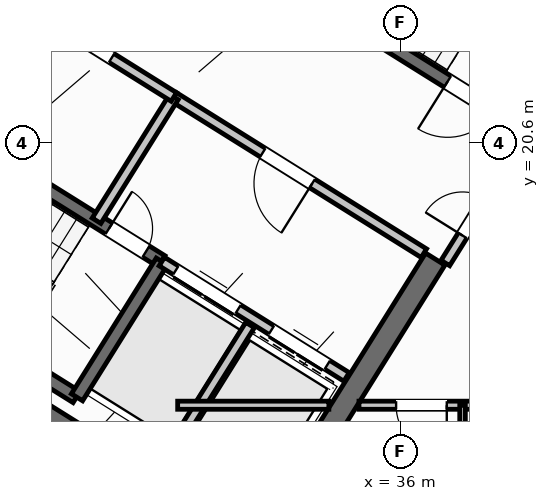
"""IFC4 building model, lengths in metres.
Left out: names, types, materials, properties, quantities, classifications, styles, units other than length and angle.
Written with IfcOpenShell. Run it as: python <this file> out.ifc"""

import sys

from ifc_helpers import new_model, si_unit, direction, frame, frame_2d, origin, place, context, subcontext, project, spatial, rectangle, extrude, source, transform, mapped, element, fill, save


model = new_model("IFC4")
c1 = context("Model", 3, precision=1e-05, world=origin(), true_north=direction((0.0, 1.0)))
c2 = subcontext(c1, "Body", "Model", "MODEL_VIEW")
j1 = project(units=[si_unit("LENGTHUNIT", "METRE"), si_unit("PLANEANGLEUNIT", "RADIAN")], contexts=[c1])
p1 = place(None, origin())
s1 = spatial("IfcSite", under=j1, at=p1, CompositionType="ELEMENT")
p2 = place(p1, origin())
s2 = spatial("IfcBuilding", under=s1, at=p2, CompositionType="ELEMENT")
p3 = place(p2, frame((0.0, 0.0, 251.1)))
s3 = spatial("IfcBuildingStorey", under=s2, at=p3, CompositionType="ELEMENT", Elevation=251.1)
p4 = place(p3, frame((33.324, 12.503, 0.0), z_axis=(0.0, 0.0, 1.0), x_axis=(-0.848043529849, 0.529926571782, 0.0)))
e1 = element("IfcWall", 1, at=p4, inside=s3, PredefinedType="SHEAR", context=c2, shape_type="SweptSolid", body=[
    extrude(rectangle(XDim=13.04, YDim=0.45, at=frame_2d((6.52, 0.0))), origin(), (0.0, 0.0, 1.0), 3.32),
])
p5 = place(p3, frame((36.683, 18.304, 0.0), z_axis=(0.0, 0.0, 1.0), x_axis=(-0.529904039071, -0.848057609704, 0.0)))
e2 = element("IfcWall", 2, at=p5, inside=s3, PredefinedType="SHEAR", context=c2, shape_type="SweptSolid", body=[
    extrude(rectangle(XDim=6.475, YDim=0.45, at=frame_2d((3.238, 0.0))), origin(), (0.0, 0.0, 1.0), 3.32),
])
p6 = place(p3, frame((29.268, 6.429, 0.0), z_axis=(0.0, 0.0, 1.0), x_axis=(-0.848049971435, 0.529916263149, 0.0)))
e3 = element("IfcWall", 3, at=p6, inside=s3, PredefinedType="STANDARD", context=c2, shape_type="SweptSolid", body=[
    extrude(rectangle(XDim=31.588, YDim=0.32, at=frame_2d((15.794, 0.0))), origin(), (0.0, 0.0, 1.0), 3.32),
])
p7 = place(p6, frame((22.848, 0.0, 0.0)))
e4 = element("IfcOpeningElement", 4, at=p7, cuts=e3, PredefinedType="OPENING", context=c2, shape_type="SweptSolid", body=[
    extrude(rectangle(XDim=1.2, YDim=2.15, at=frame_2d((0.6, 1.075))), frame((0.0, 0.17, 0.0), z_axis=(0.0, -1.0, 0.0), x_axis=(1.0, 0.0, 0.0)), (0.0, 0.0, 1.0), 0.34),
])
p8 = place(p6, frame((3.178, 0.0, 0.9)))
e5 = element("IfcOpeningElement", 5, at=p8, cuts=e3, PredefinedType="OPENING", context=c2, shape_type="SweptSolid", body=[
    extrude(rectangle(XDim=1.65, YDim=1.45, at=frame_2d((0.825, 0.725))), frame((0.0, 0.17, 0.0), z_axis=(0.0, -1.0, 0.0), x_axis=(1.0, 0.0, 0.0)), (0.0, 0.0, 1.0), 0.34),
])
p9 = place(p6, frame((8.478, 0.0, 0.9)))
e6 = element("IfcOpeningElement", 6, at=p9, cuts=e3, PredefinedType="OPENING", context=c2, shape_type="SweptSolid", body=[
    extrude(rectangle(XDim=1.65, YDim=1.45, at=frame_2d((0.825, 0.725))), frame((0.0, 0.17, 0.0), z_axis=(0.0, -1.0, 0.0), x_axis=(1.0, 0.0, 0.0)), (0.0, 0.0, 1.0), 0.34),
])
p10 = place(p3, frame((29.605, 15.581, 0.0), z_axis=(0.0, 0.0, 1.0), x_axis=(-0.848036911448, 0.529937163087, 0.0)))
e7 = element("IfcWall", 7, at=p10, inside=s3, PredefinedType="SHEAR", context=c2, shape_type="SweptSolid", body=[
    extrude(rectangle(XDim=7.46, YDim=0.26, at=frame_2d((3.73, 0.0))), origin(), (0.0, 0.0, 1.0), 3.32),
])
p11 = place(p3, frame((31.28, 18.261, 0.0), z_axis=(0.0, 0.0, 1.0), x_axis=(-0.848051618787, 0.529913626805, 0.0)))
e8 = element("IfcWall", 8, at=p11, inside=s3, PredefinedType="SHEAR", context=c2, shape_type="SweptSolid", body=[
    extrude(rectangle(XDim=7.46, YDim=0.26, at=frame_2d((3.73, 0.0))), origin(), (0.0, 0.0, 1.0), 3.32),
])
p12 = place(p11, frame((0.36, 0.0, 0.0)))
e9 = element("IfcOpeningElement", 9, at=p12, cuts=e8, PredefinedType="OPENING", context=c2, shape_type="SweptSolid", body=[
    extrude(rectangle(XDim=0.86, YDim=2.05, at=frame_2d((0.43, 1.025))), frame((0.0, 0.14, 0.0), z_axis=(0.0, -1.0, 0.0), x_axis=(1.0, 0.0, 0.0)), (0.0, 0.0, 1.0), 0.28),
])
p13 = place(p3, frame((31.288, 18.256, 0.0), z_axis=(0.0, 0.0, 1.0), x_axis=(-0.529943379326, -0.848033026897, 0.0)))
e10 = element("IfcWall", 10, at=p13, inside=s3, PredefinedType="SHEAR", context=c2, shape_type="SweptSolid", body=[
    extrude(rectangle(XDim=3.16, YDim=0.26, at=frame_2d((1.58, 0.0))), origin(), (0.0, 0.0, 1.0), 3.32),
])
p14 = place(p3, frame((38.046, 21.108, 0.0), z_axis=(0.0, 0.0, 1.0), x_axis=(-0.848054434086, 0.529909121291, 0.0)))
e11 = element("IfcWall", 11, at=p14, inside=s3, PredefinedType="SHEAR", context=c2, shape_type="SweptSolid", body=[
    extrude(rectangle(XDim=7.33, YDim=0.26, at=frame_2d((3.665, 0.0))), origin(), (0.0, 0.0, 1.0), 3.32),
])
p15 = place(p14, frame((0.22, 0.0, 0.0)))
e12 = element("IfcOpeningElement", 12, at=p15, cuts=e11, PredefinedType="OPENING", context=c2, shape_type="SweptSolid", body=[
    extrude(rectangle(XDim=1.1, YDim=2.1, at=frame_2d((0.55, 1.05))), frame((0.0, 0.14, 0.0), z_axis=(0.0, -1.0, 0.0), x_axis=(1.0, 0.0, 0.0)), (0.0, 0.0, 1.0), 0.28),
])
p16 = place(p3, frame((34.933, 15.978, 0.0), z_axis=(0.0, 0.0, 1.0), x_axis=(-0.848055739377, 0.529907032327, 0.0)))
e13 = element("IfcWall", 13, at=p16, inside=s3, PredefinedType="STANDARD", context=c2, shape_type="SweptSolid", body=[
    extrude(rectangle(XDim=4.298, YDim=0.2, at=frame_2d((2.149, 0.0))), origin(), (0.0, 0.0, 1.0), 3.31),
])
p17 = place(p16, frame((0.448, 0.0, 0.0)))
e14 = element("IfcOpeningElement", 14, at=p17, cuts=e13, PredefinedType="OPENING", context=c2, shape_type="SweptSolid", body=[
    extrude(rectangle(XDim=1.3, YDim=2.2, at=frame_2d((0.65, 1.1))), frame((0.0, 0.11, 0.0), z_axis=(0.0, -1.0, 0.0), x_axis=(1.0, 0.0, 0.0)), (0.0, 0.0, 1.0), 0.22),
])
p18 = place(p16, frame((2.523, 0.0, 0.0)))
e15 = element("IfcOpeningElement", 15, at=p18, cuts=e13, PredefinedType="OPENING", context=c2, shape_type="SweptSolid", body=[
    extrude(rectangle(XDim=1.45, YDim=2.25, at=frame_2d((0.725, 1.125))), frame((0.0, 0.11, 0.0), z_axis=(0.0, -1.0, 0.0), x_axis=(1.0, 0.0, 0.0)), (0.0, 0.0, 1.0), 0.22),
])
p19 = place(p3, frame((36.459, 18.421, 0.0), z_axis=(0.0, 0.0, 1.0), x_axis=(-0.848059591691, 0.529900867089, 0.0)))
e16 = element("IfcWall", 16, at=p19, inside=s3, PredefinedType="STANDARD", context=c2, shape_type="SweptSolid", body=[
    extrude(rectangle(XDim=5.818, YDim=0.2, at=frame_2d((2.909, 0.0))), origin(), (0.0, 0.0, 1.0), 3.31),
])
p20 = place(p19, frame((2.598, 0.0, 0.0)))
e17 = element("IfcOpeningElement", 17, at=p20, cuts=e16, PredefinedType="OPENING", context=c2, shape_type="SweptSolid", body=[
    extrude(rectangle(XDim=1.15, YDim=2.1, at=frame_2d((0.575, 1.05))), frame((0.0, 0.11, 0.0), z_axis=(0.0, -1.0, 0.0), x_axis=(1.0, 0.0, 0.0)), (0.0, 0.0, 1.0), 0.22),
])
p21 = place(p3, frame((33.029, 17.003, 0.0), z_axis=(0.0, 0.0, 1.0), x_axis=(-0.529916267533, -0.848049968695, 0.0)))
e18 = element("IfcWall", 18, at=p21, inside=s3, PredefinedType="STANDARD", context=c2, shape_type="SweptSolid", body=[
    extrude(rectangle(XDim=2.92, YDim=0.2, at=frame_2d((1.46, 0.0))), origin(), (0.0, 0.0, 1.0), 3.31),
])
p22 = place(p3, frame((31.525, 21.504, 0.0), z_axis=(0.0, 0.0, 1.0), x_axis=(-0.529907497854, -0.848055448493, 0.0)))
e19 = element("IfcWall", 19, at=p22, inside=s3, PredefinedType="STANDARD", context=c2, shape_type="SweptSolid", body=[
    extrude(rectangle(XDim=2.88, YDim=0.2, at=frame_2d((1.44, 0.0))), origin(), (0.0, 0.0, 1.0), 3.31),
])
p23 = place(p3, frame((31.525, 21.504, 0.0), z_axis=(0.0, 0.0, 1.0), x_axis=(-0.848042066329, 0.529928913853, 0.0)))
e20 = element("IfcWall", 20, at=p23, inside=s3, PredefinedType="STANDARD", context=c2, shape_type="SweptSolid", body=[
    extrude(rectangle(XDim=6.268, YDim=0.2, at=frame_2d((3.134, 0.0))), origin(), (0.0, 0.0, 1.0), 3.31),
])
p24 = place(p23, frame((4.4, 0.0, 0.0)))
e21 = element("IfcOpeningElement", 21, at=p24, cuts=e20, PredefinedType="OPENING", context=c2, shape_type="SweptSolid", body=[
    extrude(rectangle(XDim=0.86, YDim=2.05, at=frame_2d((0.43, 1.025))), frame((0.0, 0.11, 0.0), z_axis=(0.0, -1.0, 0.0), x_axis=(1.0, 0.0, 0.0)), (0.0, 0.0, 1.0), 0.22),
])
p25 = place(p23, frame((1.45, 0.0, 0.0)))
e22 = element("IfcOpeningElement", 22, at=p25, cuts=e20, PredefinedType="OPENING", context=c2, shape_type="SweptSolid", body=[
    extrude(rectangle(XDim=0.86, YDim=2.05, at=frame_2d((0.43, 1.025))), frame((0.0, 0.11, 0.0), z_axis=(0.0, -1.0, 0.0), x_axis=(1.0, 0.0, 0.0)), (0.0, 0.0, 1.0), 0.22),
])
p26 = place(p3, frame((32.164, 10.374, 0.0), z_axis=(0.0, 0.0, 1.0), x_axis=(-0.848044107957, 0.529925646633, 0.0)))
e23 = element("IfcWall", 23, at=p26, inside=s3, PredefinedType="PARTITIONING", context=c2, shape_type="SweptSolid", body=[
    extrude(rectangle(XDim=15.57, YDim=0.16, at=frame_2d((7.785, 0.0))), origin(), (0.0, 0.0, 1.0), 3.31),
])
p27 = place(p26, frame((10.83, 0.0, 0.0)))
e24 = element("IfcOpeningElement", 24, at=p27, cuts=e23, PredefinedType="OPENING", context=c2, shape_type="SweptSolid", body=[
    extrude(rectangle(XDim=1.0, YDim=2.1, at=frame_2d((0.5, 1.05))), frame((0.0, 0.09, 0.0), z_axis=(0.0, -1.0, 0.0), x_axis=(1.0, 0.0, 0.0)), (0.0, 0.0, 1.0), 0.18),
])
p28 = place(p3, frame((29.72, 8.859, 0.0), z_axis=(0.0, 0.0, 1.0), x_axis=(-0.848049134363, 0.529917602752, 0.0)))
e25 = element("IfcWall", 25, at=p28, inside=s3, PredefinedType="PLUMBINGWALL", context=c2, shape_type="SweptSolid", body=[
    extrude(rectangle(XDim=14.3, YDim=0.14, at=frame_2d((7.15, 0.0))), origin(), (0.0, 0.0, 1.0), 3.31),
])
p29 = place(p28, frame((9.57, 0.0, 0.0)))
e26 = element("IfcOpeningElement", 26, at=p29, cuts=e25, PredefinedType="OPENING", context=c2, shape_type="SweptSolid", body=[
    extrude(rectangle(XDim=0.92, YDim=2.08, at=frame_2d((0.46, 1.04))), frame((0.0, 0.08, 0.0), z_axis=(0.0, -1.0, 0.0), x_axis=(1.0, 0.0, 0.0)), (0.0, 0.0, 1.0), 0.16),
])
p30 = place(p3, frame((38.451, 20.737, 0.0), z_axis=(0.0, 0.0, 1.0), x_axis=(-0.529924799939, -0.848044637038, 0.0)))
e27 = element("IfcWall", 27, at=p30, inside=s3, PredefinedType="STANDARD", context=c2, shape_type="SweptSolid", body=[
    extrude(rectangle(XDim=2.96, YDim=0.2, at=frame_2d((1.48, 0.0))), origin(), (0.0, 0.0, 1.0), 3.31),
])
p31 = place(p30, frame((1.46, 0.0, 0.0)))
e28 = element("IfcOpeningElement", 28, at=p31, cuts=e27, PredefinedType="OPENING", context=c2, shape_type="SweptSolid", body=[
    extrude(rectangle(XDim=0.86, YDim=2.05, at=frame_2d((0.43, 1.025))), frame((0.0, 0.11, 0.0), z_axis=(0.0, -1.0, 0.0), x_axis=(1.0, 0.0, 0.0)), (0.0, 0.0, 1.0), 0.22),
])
p32 = place(p3, frame((31.6, 15.42, 0.0), z_axis=(0.0, 0.0, 1.0), x_axis=(1.0, 0.0, 0.0)))
e29 = element("IfcWall", 29, at=p32, inside=s3, PredefinedType="PARTITIONING", context=c2, shape_type="SweptSolid", body=[
    extrude(rectangle(XDim=2.984, YDim=0.16, at=frame_2d((1.492, 0.0))), origin(), (0.0, 0.0, 1.0), 3.31),
])
p33 = place(p3, frame((35.178, 15.42, 0.0), z_axis=(0.0, 0.0, 1.0), x_axis=(1.0, 0.0, 0.0)))
e30 = element("IfcWall", 30, at=p33, inside=s3, PredefinedType="PARTITIONING", context=c2, shape_type="SweptSolid", body=[
    extrude(rectangle(XDim=15.552, YDim=0.16, at=frame_2d((7.776, 0.0))), origin(), (0.0, 0.0, 1.0), 3.31),
])
p34 = place(p33, frame((0.733, 0.0, 0.0)))
e31 = element("IfcOpeningElement", 31, at=p34, cuts=e30, PredefinedType="OPENING", context=c2, shape_type="SweptSolid", body=[
    extrude(rectangle(XDim=1.0, YDim=2.1, at=frame_2d((0.5, 1.05))), frame((0.0, 0.09, 0.0), z_axis=(0.0, -1.0, 0.0), x_axis=(1.0, 0.0, 0.0)), (0.0, 0.0, 1.0), 0.18),
])
p35 = place(p33, frame((9.153, 0.0, 0.0)))
e32 = element("IfcOpeningElement", 32, at=p35, cuts=e30, PredefinedType="OPENING", context=c2, shape_type="SweptSolid", body=[
    extrude(rectangle(XDim=1.0, YDim=2.1, at=frame_2d((0.5, 1.05))), frame((0.0, 0.09, 0.0), z_axis=(0.0, -1.0, 0.0), x_axis=(1.0, 0.0, 0.0)), (0.0, 0.0, 1.0), 0.18),
])
p36 = place(p3, frame((37.222, 1.96, 0.0), z_axis=(0.0, 0.0, 1.0), x_axis=(0.0, 1.0, 0.0)))
e33 = element("IfcWall", 33, at=p36, inside=s3, PredefinedType="PARTITIONING", context=c2, shape_type="SweptSolid", body=[
    extrude(rectangle(XDim=13.46, YDim=0.11, at=frame_2d((6.73, 0.0))), origin(), (0.0, 0.0, 1.0), 3.31),
])
p37 = place(p36, frame((5.2, 0.0, 0.0)))
e34 = element("IfcOpeningElement", 34, at=p37, cuts=e33, PredefinedType="OPENING", context=c2, shape_type="SweptSolid", body=[
    extrude(rectangle(XDim=0.92, YDim=2.08, at=frame_2d((0.46, 1.04))), frame((0.0, 0.065, 0.0), z_axis=(0.0, -1.0, 0.0), x_axis=(1.0, 0.0, 0.0)), (0.0, 0.0, 1.0), 0.13),
])
p38 = place(p36, frame((10.45, 0.0, 0.0)))
e35 = element("IfcOpeningElement", 35, at=p38, cuts=e33, PredefinedType="OPENING", context=c2, shape_type="SweptSolid", body=[
    extrude(rectangle(XDim=0.88, YDim=2.08, at=frame_2d((0.44, 1.04))), frame((0.0, 0.065, 0.0), z_axis=(0.0, -1.0, 0.0), x_axis=(1.0, 0.0, 0.0)), (0.0, 0.0, 1.0), 0.13),
])
m1 = source(origin(), c2, "Body", "SweptSolid", [
    extrude(rectangle(XDim=0.86, YDim=2.05, at=frame_2d((0.43, 1.025))), frame((0.0, 0.025, 0.0), z_axis=(0.0, -1.0, 0.0), x_axis=(1.0, 0.0, 0.0)), (0.0, 0.0, 1.0), 0.05),
])
p39 = place(p12, frame((0.86, 0.0, 0.0), z_axis=(0.0, 0.0, 1.0), x_axis=(-1.0, 0.0, 0.0)))
e36 = element("IfcDoor", 36, at=p39, inside=s3, OperationType="SINGLE_SWING_LEFT", PredefinedType="DOOR", context=c2, shape_type="MappedRepresentation", body=[
    mapped(m1, transform((0.0, 0.0, 0.0), scale=1.0)),
])
fill(e9, e36)
m2 = source(origin(), c2, "Body", "SweptSolid", [
    extrude(rectangle(XDim=1.1, YDim=2.1, at=frame_2d((0.55, 1.05))), frame((0.0, 0.025, 0.0), z_axis=(0.0, -1.0, 0.0), x_axis=(1.0, 0.0, 0.0)), (0.0, 0.0, 1.0), 0.05),
])
p40 = place(p15, origin())
e37 = element("IfcDoor", 37, at=p40, inside=s3, OperationType="SINGLE_SWING_RIGHT", PredefinedType="DOOR", context=c2, shape_type="MappedRepresentation", body=[
    mapped(m2, transform((0.0, 0.0, 0.0), scale=1.0)),
])
fill(e12, e37)
m3 = source(origin(), c2, "Body", "SweptSolid", [
    extrude(rectangle(XDim=1.15, YDim=2.1, at=frame_2d((0.575, 1.05))), frame((0.0, 0.025, 0.0), z_axis=(0.0, -1.0, 0.0), x_axis=(1.0, 0.0, 0.0)), (0.0, 0.0, 1.0), 0.05),
])
p41 = place(p20, origin())
e38 = element("IfcDoor", 38, at=p41, inside=s3, OperationType="SINGLE_SWING_LEFT", PredefinedType="DOOR", context=c2, shape_type="MappedRepresentation", body=[
    mapped(m3, transform((0.0, 0.0, 0.0), scale=1.0)),
])
fill(e17, e38)
m4 = source(origin(), c2, "Body", "SweptSolid", [
    extrude(rectangle(XDim=1.3, YDim=2.2, at=frame_2d((0.65, 1.1))), frame((0.0, 0.025, 0.0), z_axis=(0.0, -1.0, 0.0), x_axis=(1.0, 0.0, 0.0)), (0.0, 0.0, 1.0), 0.05),
])
p42 = place(p17, origin())
e39 = element("IfcDoor", 39, at=p42, inside=s3, OperationType="DOUBLE_DOOR_SLIDING", PredefinedType="DOOR", context=c2, shape_type="MappedRepresentation", body=[
    mapped(m4, transform((0.0, 0.0, 0.0), scale=1.0)),
])
fill(e14, e39)
m5 = source(origin(), c2, "Body", "SweptSolid", [
    extrude(rectangle(XDim=1.45, YDim=2.25, at=frame_2d((0.725, 1.125))), frame((0.0, 0.025, 0.0), z_axis=(0.0, -1.0, 0.0), x_axis=(1.0, 0.0, 0.0)), (0.0, 0.0, 1.0), 0.05),
])
p43 = place(p18, origin())
e40 = element("IfcDoor", 40, at=p43, inside=s3, OperationType="DOUBLE_DOOR_SLIDING", PredefinedType="DOOR", context=c2, shape_type="MappedRepresentation", body=[
    mapped(m5, transform((0.0, 0.0, 0.0), scale=1.0)),
])
fill(e15, e40)
p44 = place(p25, frame((0.86, 0.0, 0.0), z_axis=(0.0, 0.0, 1.0), x_axis=(-1.0, 0.0, 0.0)))
e41 = element("IfcDoor", 41, at=p44, inside=s3, OperationType="SINGLE_SWING_LEFT", PredefinedType="DOOR", context=c2, shape_type="MappedRepresentation", body=[
    mapped(m1, transform((0.0, 0.0, 0.0), scale=1.0)),
])
fill(e22, e41)
p45 = place(p31, frame((0.86, 0.0, 0.0), z_axis=(0.0, 0.0, 1.0), x_axis=(-1.0, 0.0, 0.0)))
e42 = element("IfcDoor", 42, at=p45, inside=s3, OperationType="SINGLE_SWING_LEFT", PredefinedType="DOOR", context=c2, shape_type="MappedRepresentation", body=[
    mapped(m1, transform((0.0, 0.0, 0.0), scale=1.0)),
])
fill(e28, e42)
m6 = source(origin(), c2, "Body", "SweptSolid", [
    extrude(rectangle(XDim=1.0, YDim=2.1, at=frame_2d((0.5, 1.05))), frame((0.0, 0.025, 0.0), z_axis=(0.0, -1.0, 0.0), x_axis=(1.0, 0.0, 0.0)), (0.0, 0.0, 1.0), 0.05),
])
p46 = place(p34, frame((1.0, 0.0, 0.0), z_axis=(0.0, 0.0, 1.0), x_axis=(-1.0, 0.0, 0.0)))
e43 = element("IfcDoor", 43, at=p46, inside=s3, OperationType="SINGLE_SWING_LEFT", PredefinedType="DOOR", context=c2, shape_type="MappedRepresentation", body=[
    mapped(m6, transform((0.0, 0.0, 0.0), scale=1.0)),
])
fill(e31, e43)
save(model, sys.argv[1])
